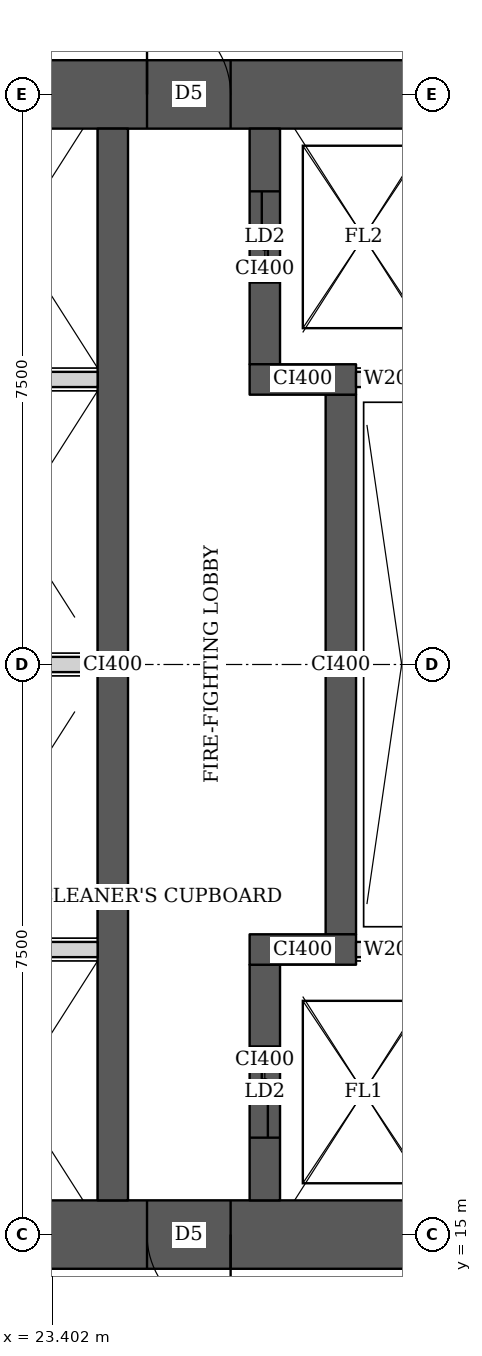
"""IFC4 building model, lengths in metres.
Left out: names, types, materials, properties, quantities, classifications, styles, units other than length and angle.
Written with IfcOpenShell. Run it as: python <this file> out.ifc"""

import sys

from ifc_helpers import new_model, si_unit, direction, frame, frame_2d, origin, place, context, subcontext, project, spatial, rectangle, extrude, element, fill, save


model = new_model("IFC4")
c1 = context("Model", 3, precision=1e-05, world=origin(), true_north=direction((0.0, 1.0)))
c2 = subcontext(c1, "Body", "Model", "MODEL_VIEW")
j1 = project(units=[si_unit("LENGTHUNIT", "METRE"), si_unit("PLANEANGLEUNIT", "RADIAN")], contexts=[c1])
p1 = place(None, origin())
s1 = spatial("IfcSite", under=j1, at=p1, CompositionType="ELEMENT")
p2 = place(p1, origin())
s2 = spatial("IfcBuilding", under=s1, at=p2, CompositionType="ELEMENT")
p3 = place(p2, frame((0.0, 0.0, 65.0)))
s3 = spatial("IfcBuildingStorey", under=s2, at=p3, CompositionType="ELEMENT", Elevation=65.0)
p4 = place(p3, frame((13.95, 15.0, 0.0), z_axis=(0.0, 0.0, 1.0), x_axis=(1.0, 0.0, 0.0)))
e1 = element("IfcWall", 1, at=p4, inside=s3, PredefinedType="SHEAR", context=c2, shape_type="SweptSolid", body=[
    extrude(rectangle(XDim=15.3, YDim=0.9, at=frame_2d((7.65, 0.0))), origin(), (0.0, 0.0, 1.0), 3.75),
])
p5 = place(p4, frame((4.45, 0.0, 0.0)))
e2 = element("IfcOpeningElement", 2, at=p5, cuts=e1, PredefinedType="OPENING", context=c2, shape_type="SweptSolid", body=[
    extrude(rectangle(XDim=1.8, YDim=2.1, at=frame_2d((0.9, 1.05))), frame((0.0, 0.46, 0.0), z_axis=(0.0, -1.0, 0.0), x_axis=(1.0, 0.0, 0.0)), (0.0, 0.0, 1.0), 0.92),
])
p6 = place(p4, frame((10.7, 0.0, 0.0)))
e3 = element("IfcOpeningElement", 3, at=p6, cuts=e1, PredefinedType="OPENING", context=c2, shape_type="SweptSolid", body=[
    extrude(rectangle(XDim=1.1, YDim=2.1, at=frame_2d((0.55, 1.05))), frame((0.0, 0.46, 0.0), z_axis=(0.0, -1.0, 0.0), x_axis=(1.0, 0.0, 0.0)), (0.0, 0.0, 1.0), 0.92),
])
p7 = place(p3, frame((13.95, 30.0, 0.0), z_axis=(0.0, 0.0, 1.0), x_axis=(1.0, 0.0, 0.0)))
e4 = element("IfcWall", 4, at=p7, inside=s3, PredefinedType="SHEAR", context=c2, shape_type="SweptSolid", body=[
    extrude(rectangle(XDim=15.3, YDim=0.9, at=frame_2d((7.65, 0.0))), origin(), (0.0, 0.0, 1.0), 3.75),
])
p8 = place(p7, frame((4.45, 0.0, 0.0)))
e5 = element("IfcOpeningElement", 5, at=p8, cuts=e4, PredefinedType="OPENING", context=c2, shape_type="SweptSolid", body=[
    extrude(rectangle(XDim=1.8, YDim=2.1, at=frame_2d((0.9, 1.05))), frame((0.0, 0.46, 0.0), z_axis=(0.0, -1.0, 0.0), x_axis=(1.0, 0.0, 0.0)), (0.0, 0.0, 1.0), 0.92),
])
p9 = place(p7, frame((10.7, 0.0, 0.0)))
e6 = element("IfcOpeningElement", 6, at=p9, cuts=e4, PredefinedType="OPENING", context=c2, shape_type="SweptSolid", body=[
    extrude(rectangle(XDim=1.1, YDim=2.1, at=frame_2d((0.55, 1.05))), frame((0.0, 0.46, 0.0), z_axis=(0.0, -1.0, 0.0), x_axis=(1.0, 0.0, 0.0)), (0.0, 0.0, 1.0), 0.92),
])
p10 = place(p3, frame((24.2, 15.45, 0.0), z_axis=(0.0, 0.0, 1.0), x_axis=(0.0, 1.0, 0.0)))
e7 = element("IfcWall", 7, at=p10, inside=s3, PredefinedType="SHEAR", context=c2, shape_type="SweptSolid", body=[
    extrude(rectangle(XDim=14.1, YDim=0.4, at=frame_2d((7.05, 0.0))), origin(), (0.0, 0.0, 1.0), 3.75),
])
p11 = place(p3, frame((26.2, 15.45, 0.0), z_axis=(0.0, 0.0, 1.0), x_axis=(0.0, 1.0, 0.0)))
e8 = element("IfcWall", 8, at=p11, inside=s3, PredefinedType="SHEAR", context=c2, shape_type="SweptSolid", body=[
    extrude(rectangle(XDim=3.1, YDim=0.4, at=frame_2d((1.55, 0.0))), origin(), (0.0, 0.0, 1.0), 3.75),
])
p12 = place(p11, frame((0.825, 0.0, 0.0)))
e9 = element("IfcOpeningElement", 9, at=p12, cuts=e8, PredefinedType="OPENING", context=c2, shape_type="SweptSolid", body=[
    extrude(rectangle(XDim=1.2, YDim=2.1, at=frame_2d((0.6, 1.05))), frame((0.0, 0.21, 0.0), z_axis=(0.0, -1.0, 0.0), x_axis=(1.0, 0.0, 0.0)), (0.0, 0.0, 1.0), 0.42),
])
p13 = place(p3, frame((26.0, 18.75, 0.0), z_axis=(0.0, 0.0, 1.0), x_axis=(1.0, 0.0, 0.0)))
e10 = element("IfcWall", 10, at=p13, inside=s3, PredefinedType="SHEAR", context=c2, shape_type="SweptSolid", body=[
    extrude(rectangle(XDim=1.4, YDim=0.4, at=frame_2d((0.7, 0.0))), origin(), (0.0, 0.0, 1.0), 3.75),
])
p14 = place(p3, frame((27.2, 18.95, 0.0), z_axis=(0.0, 0.0, 1.0), x_axis=(0.0, 1.0, 0.0)))
e11 = element("IfcWall", 11, at=p14, inside=s3, PredefinedType="SHEAR", context=c2, shape_type="SweptSolid", body=[
    extrude(rectangle(XDim=7.1, YDim=0.4, at=frame_2d((3.55, 0.0))), origin(), (0.0, 0.0, 1.0), 3.75),
])
p15 = place(p3, frame((26.0, 26.25, 0.0), z_axis=(0.0, 0.0, 1.0), x_axis=(1.0, 0.0, 0.0)))
e12 = element("IfcWall", 12, at=p15, inside=s3, PredefinedType="SHEAR", context=c2, shape_type="SweptSolid", body=[
    extrude(rectangle(XDim=1.4, YDim=0.4, at=frame_2d((0.7, 0.0))), origin(), (0.0, 0.0, 1.0), 3.75),
])
p16 = place(p3, frame((26.2, 26.45, 0.0), z_axis=(0.0, 0.0, 1.0), x_axis=(0.0, 1.0, 0.0)))
e13 = element("IfcWall", 13, at=p16, inside=s3, PredefinedType="SHEAR", context=c2, shape_type="SweptSolid", body=[
    extrude(rectangle(XDim=3.1, YDim=0.4, at=frame_2d((1.55, 0.0))), origin(), (0.0, 0.0, 1.0), 3.75),
])
p17 = place(p16, frame((1.075, 0.0, 0.0)))
e14 = element("IfcOpeningElement", 14, at=p17, cuts=e13, PredefinedType="OPENING", context=c2, shape_type="SweptSolid", body=[
    extrude(rectangle(XDim=1.2, YDim=2.1, at=frame_2d((0.6, 1.05))), frame((0.0, 0.21, 0.0), z_axis=(0.0, -1.0, 0.0), x_axis=(1.0, 0.0, 0.0)), (0.0, 0.0, 1.0), 0.42),
])
for number, where, z_axis, x_axis in (
    (15, (21.8, 18.75, 0.0), (0.0, 0.0, 1.0), (1.0, 0.0, 0.0)),
    (16, (21.8, 22.5, 0.0), (0.0, 0.0, 1.0), (1.0, 0.0, 0.0)),
    (17, (21.8, 26.25, 0.0), (0.0, 0.0, 1.0), (1.0, 0.0, 0.0)),
):
    element("IfcWall", number, at=place(p3, frame(where, z_axis=z_axis, x_axis=x_axis)), inside=s3, PredefinedType="SOLIDWALL", context=c2, shape_type="SweptSolid", body=[
        extrude(rectangle(XDim=2.2, YDim=0.2, at=frame_2d((1.1, 0.0))), origin(), (0.0, 0.0, 1.0), 3.5),
    ])
for number, where, z_axis, x_axis in (
    (18, (27.4, 18.75, 0.0), (0.0, 0.0, 1.0), (1.0, 0.0, 0.0)),
    (19, (27.4, 26.25, 0.0), (0.0, 0.0, 1.0), (1.0, 0.0, 0.0)),
):
    element("IfcWall", number, at=place(p3, frame(where, z_axis=z_axis, x_axis=x_axis)), inside=s3, PredefinedType="SOLIDWALL", context=c2, shape_type="SweptSolid", body=[
        extrude(rectangle(XDim=0.95, YDim=0.2, at=frame_2d((0.475, 0.0))), origin(), (0.0, 0.0, 1.0), 3.5),
    ])
p18 = place(p6, origin())
e20 = element("IfcDoor", 20, at=p18, inside=s3, OperationType="SINGLE_SWING_LEFT", PredefinedType="DOOR", context=c2, shape_type="SweptSolid", body=[
    extrude(rectangle(XDim=1.1, YDim=2.1, at=frame_2d((0.55, 1.05))), frame((0.0, 0.025, 0.0), z_axis=(0.0, -1.0, 0.0), x_axis=(1.0, 0.0, 0.0)), (0.0, 0.0, 1.0), 0.05),
])
fill(e3, e20)
p19 = place(p9, origin())
e21 = element("IfcDoor", 21, at=p19, inside=s3, OperationType="SINGLE_SWING_LEFT", PredefinedType="DOOR", context=c2, shape_type="SweptSolid", body=[
    extrude(rectangle(XDim=1.1, YDim=2.1, at=frame_2d((0.55, 1.05))), frame((0.0, 0.025, 0.0), z_axis=(0.0, -1.0, 0.0), x_axis=(1.0, 0.0, 0.0)), (0.0, 0.0, 1.0), 0.05),
])
fill(e6, e21)
p20 = place(p12, origin())
e22 = element("IfcDoor", 22, at=p20, inside=s3, OperationType="DOUBLE_DOOR_SLIDING", PredefinedType="DOOR", context=c2, shape_type="SweptSolid", body=[
    extrude(rectangle(XDim=1.2, YDim=2.1, at=frame_2d((0.6, 1.05))), frame((0.0, 0.025, 0.0), z_axis=(0.0, -1.0, 0.0), x_axis=(1.0, 0.0, 0.0)), (0.0, 0.0, 1.0), 0.05),
])
fill(e9, e22)
p21 = place(p17, origin())
e23 = element("IfcDoor", 23, at=p21, inside=s3, OperationType="DOUBLE_DOOR_SLIDING", PredefinedType="DOOR", context=c2, shape_type="SweptSolid", body=[
    extrude(rectangle(XDim=1.2, YDim=2.1, at=frame_2d((0.6, 1.05))), frame((0.0, 0.025, 0.0), z_axis=(0.0, -1.0, 0.0), x_axis=(1.0, 0.0, 0.0)), (0.0, 0.0, 1.0), 0.05),
])
fill(e14, e23)
save(model, sys.argv[1])
